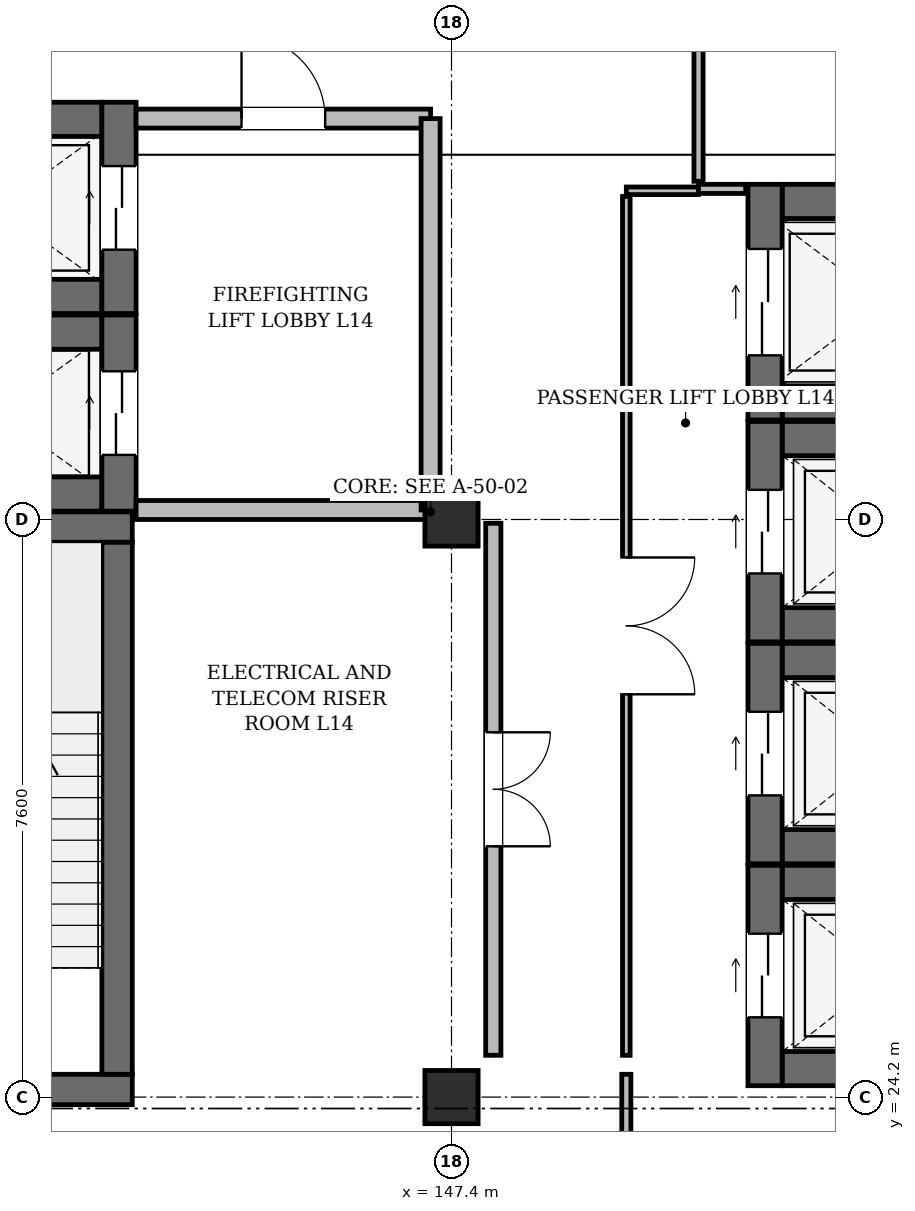
"""IFC4 building model, lengths in metres.
Left out: names, types, materials, properties, quantities, classifications, styles, units other than length and angle.
Written with IfcOpenShell. Run it as: python <this file> out.ifc"""

import sys

from ifc_helpers import new_model, si_unit, direction, frame, frame_2d, origin, origin_2d, place, context, subcontext, project, spatial, rectangle, extrude, element, fill, save


model = new_model("IFC4")
c1 = context("Model", 3, precision=1e-05, world=origin(), true_north=direction((0.0, 1.0)))
c2 = subcontext(c1, "Body", "Model", "MODEL_VIEW")
j1 = project(units=[si_unit("LENGTHUNIT", "METRE"), si_unit("PLANEANGLEUNIT", "RADIAN")], contexts=[c1])
p1 = place(None, origin())
s1 = spatial("IfcSite", under=j1, at=p1, CompositionType="ELEMENT")
p2 = place(p1, origin())
s2 = spatial("IfcBuilding", under=s1, at=p2, CompositionType="ELEMENT")
p3 = place(p2, frame((0.0, 0.0, 61.8)))
s3 = spatial("IfcBuildingStorey", under=s2, at=p3, CompositionType="ELEMENT", Elevation=61.8)
for number, where, z_axis, x_axis in (
    (1, (147.4, 24.2, 0.0), (0.0, 0.0, 1.0), (1.0, 0.0, 0.0)),
    (2, (147.4, 31.8, 0.0), (0.0, 0.0, 1.0), (1.0, 0.0, 0.0)),
):
    element("IfcColumn", number, at=place(p3, frame(where, z_axis=z_axis, x_axis=x_axis)), inside=s3, PredefinedType="COLUMN", context=c2, shape_type="SweptSolid", body=[
        extrude(rectangle(XDim=0.7, YDim=0.7, at=origin_2d()), origin(), (0.0, 0.0, 1.0), 4.11),
    ])
p4 = place(p3, frame((139.4, 24.3, 0.0), z_axis=(0.0, 0.0, 1.0), x_axis=(1.0, 0.0, 0.0)))
e3 = element("IfcWall", 3, at=p4, inside=s3, PredefinedType="SHEAR", context=c2, shape_type="SweptSolid", body=[
    extrude(rectangle(XDim=3.8, YDim=0.4, at=frame_2d((1.9, 0.0))), origin(), (0.0, 0.0, 1.0), 4.11),
])
p5 = place(p4, frame((1.3, 0.0, 0.0)))
e4 = element("IfcOpeningElement", 4, at=p5, cuts=e3, PredefinedType="OPENING", context=c2, shape_type="SweptSolid", body=[
    extrude(rectangle(XDim=1.2, YDim=2.2, at=frame_2d((0.6, 1.1))), frame((0.0, 0.212, 0.0), z_axis=(0.0, -1.0, 0.0), x_axis=(1.0, 0.0, 0.0)), (0.0, 0.0, 1.0), 0.424),
])
p6 = place(p3, frame((139.4, 31.7, 0.0), z_axis=(0.0, 0.0, 1.0), x_axis=(1.0, 0.0, 0.0)))
e5 = element("IfcWall", 5, at=p6, inside=s3, PredefinedType="SHEAR", context=c2, shape_type="SweptSolid", body=[
    extrude(rectangle(XDim=3.8, YDim=0.4, at=frame_2d((1.9, 0.0))), origin(), (0.0, 0.0, 1.0), 4.11),
])
p7 = place(p3, frame((143.0, 24.5, 0.0), z_axis=(0.0, 0.0, 1.0), x_axis=(0.0, 1.0, 0.0)))
e6 = element("IfcWall", 6, at=p7, inside=s3, PredefinedType="SHEAR", context=c2, shape_type="SweptSolid", body=[
    extrude(rectangle(XDim=7.0, YDim=0.4, at=frame_2d((3.5, 0.0))), origin(), (0.0, 0.0, 1.0), 4.11),
])
for number, where, z_axis, x_axis in (
    (7, (140.06, 32.135, 0.0), (0.0, 0.0, 1.0), (1.0, 0.0, 0.0)),
    (8, (140.06, 34.265, 0.0), (0.0, 0.0, 1.0), (1.0, 0.0, 0.0)),
):
    element("IfcWall", number, at=place(p3, frame(where, z_axis=z_axis, x_axis=x_axis)), inside=s3, PredefinedType="SHEAR", context=c2, shape_type="SweptSolid", body=[
        extrude(rectangle(XDim=2.74, YDim=0.45, at=frame_2d((1.37, 0.0))), origin(), (0.0, 0.0, 1.0), 4.11),
    ])
p8 = place(p3, frame((143.025, 31.91, 0.0), z_axis=(0.0, 0.0, 1.0), x_axis=(0.0, 1.0, 0.0)))
e9 = element("IfcWall", 9, at=p8, inside=s3, PredefinedType="SHEAR", context=c2, shape_type="SweptSolid", body=[
    extrude(rectangle(XDim=2.58, YDim=0.45, at=frame_2d((1.29, 0.0))), origin(), (0.0, 0.0, 1.0), 4.11),
])
p9 = place(p8, frame((0.74, 0.0, 0.0)))
e10 = element("IfcOpeningElement", 10, at=p9, cuts=e9, PredefinedType="OPENING", context=c2, shape_type="SweptSolid", body=[
    extrude(rectangle(XDim=1.1, YDim=2.2, at=frame_2d((0.55, 1.1))), frame((0.0, 0.237, 0.0), z_axis=(0.0, -1.0, 0.0), x_axis=(1.0, 0.0, 0.0)), (0.0, 0.0, 1.0), 0.474),
])
for number, where, z_axis, x_axis in (
    (11, (140.06, 34.735, 0.0), (0.0, 0.0, 1.0), (1.0, 0.0, 0.0)),
    (12, (140.06, 37.065, 0.0), (0.0, 0.0, 1.0), (1.0, 0.0, 0.0)),
):
    element("IfcWall", number, at=place(p3, frame(where, z_axis=z_axis, x_axis=x_axis)), inside=s3, PredefinedType="SHEAR", context=c2, shape_type="SweptSolid", body=[
        extrude(rectangle(XDim=2.74, YDim=0.45, at=frame_2d((1.37, 0.0))), origin(), (0.0, 0.0, 1.0), 4.11),
    ])
p10 = place(p3, frame((143.025, 34.51, 0.0), z_axis=(0.0, 0.0, 1.0), x_axis=(0.0, 1.0, 0.0)))
e13 = element("IfcWall", 13, at=p10, inside=s3, PredefinedType="SHEAR", context=c2, shape_type="SweptSolid", body=[
    extrude(rectangle(XDim=2.78, YDim=0.45, at=frame_2d((1.39, 0.0))), origin(), (0.0, 0.0, 1.0), 4.11),
])
p11 = place(p10, frame((0.84, 0.0, 0.0)))
e14 = element("IfcOpeningElement", 14, at=p11, cuts=e13, PredefinedType="OPENING", context=c2, shape_type="SweptSolid", body=[
    extrude(rectangle(XDim=1.1, YDim=2.2, at=frame_2d((0.55, 1.1))), frame((0.0, 0.237, 0.0), z_axis=(0.0, -1.0, 0.0), x_axis=(1.0, 0.0, 0.0)), (0.0, 0.0, 1.0), 0.474),
])
for number, where, z_axis, x_axis in (
    (15, (151.75, 24.575, 0.0), (0.0, 0.0, 1.0), (1.0, 0.0, 0.0)),
    (16, (151.75, 27.025, 0.0), (0.0, 0.0, 1.0), (1.0, 0.0, 0.0)),
):
    element("IfcWall", number, at=place(p3, frame(where, z_axis=z_axis, x_axis=x_axis)), inside=s3, PredefinedType="SHEAR", context=c2, shape_type="SweptSolid", body=[
        extrude(rectangle(XDim=2.7, YDim=0.45, at=frame_2d((1.35, 0.0))), origin(), (0.0, 0.0, 1.0), 4.11),
    ])
p12 = place(p3, frame((151.525, 24.35, 0.0), z_axis=(0.0, 0.0, 1.0), x_axis=(0.0, 1.0, 0.0)))
e17 = element("IfcWall", 17, at=p12, inside=s3, PredefinedType="SHEAR", context=c2, shape_type="SweptSolid", body=[
    extrude(rectangle(XDim=2.9, YDim=0.45, at=frame_2d((1.45, 0.0))), origin(), (0.0, 0.0, 1.0), 4.11),
])
p13 = place(p12, frame((0.9, 0.0, 0.0)))
e18 = element("IfcOpeningElement", 18, at=p13, cuts=e17, PredefinedType="OPENING", context=c2, shape_type="SweptSolid", body=[
    extrude(rectangle(XDim=1.1, YDim=2.2, at=frame_2d((0.55, 1.1))), frame((0.0, 0.237, 0.0), z_axis=(0.0, -1.0, 0.0), x_axis=(1.0, 0.0, 0.0)), (0.0, 0.0, 1.0), 0.474),
])
for number, where, z_axis, x_axis in (
    (19, (151.75, 27.495, 0.0), (0.0, 0.0, 1.0), (1.0, 0.0, 0.0)),
    (20, (151.75, 29.945, 0.0), (0.0, 0.0, 1.0), (1.0, 0.0, 0.0)),
):
    element("IfcWall", number, at=place(p3, frame(where, z_axis=z_axis, x_axis=x_axis)), inside=s3, PredefinedType="SHEAR", context=c2, shape_type="SweptSolid", body=[
        extrude(rectangle(XDim=2.7, YDim=0.45, at=frame_2d((1.35, 0.0))), origin(), (0.0, 0.0, 1.0), 4.11),
    ])
p14 = place(p3, frame((151.525, 27.27, 0.0), z_axis=(0.0, 0.0, 1.0), x_axis=(0.0, 1.0, 0.0)))
e21 = element("IfcWall", 21, at=p14, inside=s3, PredefinedType="SHEAR", context=c2, shape_type="SweptSolid", body=[
    extrude(rectangle(XDim=2.9, YDim=0.45, at=frame_2d((1.45, 0.0))), origin(), (0.0, 0.0, 1.0), 4.11),
])
p15 = place(p14, frame((0.9, 0.0, 0.0)))
e22 = element("IfcOpeningElement", 22, at=p15, cuts=e21, PredefinedType="OPENING", context=c2, shape_type="SweptSolid", body=[
    extrude(rectangle(XDim=1.1, YDim=2.2, at=frame_2d((0.55, 1.1))), frame((0.0, 0.237, 0.0), z_axis=(0.0, -1.0, 0.0), x_axis=(1.0, 0.0, 0.0)), (0.0, 0.0, 1.0), 0.474),
])
for number, where, z_axis, x_axis in (
    (23, (151.75, 30.415, 0.0), (0.0, 0.0, 1.0), (1.0, 0.0, 0.0)),
    (24, (151.75, 32.865, 0.0), (0.0, 0.0, 1.0), (1.0, 0.0, 0.0)),
):
    element("IfcWall", number, at=place(p3, frame(where, z_axis=z_axis, x_axis=x_axis)), inside=s3, PredefinedType="SHEAR", context=c2, shape_type="SweptSolid", body=[
        extrude(rectangle(XDim=2.7, YDim=0.45, at=frame_2d((1.35, 0.0))), origin(), (0.0, 0.0, 1.0), 4.11),
    ])
p16 = place(p3, frame((151.525, 30.19, 0.0), z_axis=(0.0, 0.0, 1.0), x_axis=(0.0, 1.0, 0.0)))
e25 = element("IfcWall", 25, at=p16, inside=s3, PredefinedType="SHEAR", context=c2, shape_type="SweptSolid", body=[
    extrude(rectangle(XDim=2.9, YDim=0.45, at=frame_2d((1.45, 0.0))), origin(), (0.0, 0.0, 1.0), 4.11),
])
p17 = place(p16, frame((0.9, 0.0, 0.0)))
e26 = element("IfcOpeningElement", 26, at=p17, cuts=e25, PredefinedType="OPENING", context=c2, shape_type="SweptSolid", body=[
    extrude(rectangle(XDim=1.1, YDim=2.2, at=frame_2d((0.55, 1.1))), frame((0.0, 0.237, 0.0), z_axis=(0.0, -1.0, 0.0), x_axis=(1.0, 0.0, 0.0)), (0.0, 0.0, 1.0), 0.474),
])
for number, where, z_axis, x_axis in (
    (27, (151.75, 33.335, 0.0), (0.0, 0.0, 1.0), (1.0, 0.0, 0.0)),
    (28, (151.75, 35.985, 0.0), (0.0, 0.0, 1.0), (1.0, 0.0, 0.0)),
):
    element("IfcWall", number, at=place(p3, frame(where, z_axis=z_axis, x_axis=x_axis)), inside=s3, PredefinedType="SHEAR", context=c2, shape_type="SweptSolid", body=[
        extrude(rectangle(XDim=2.7, YDim=0.45, at=frame_2d((1.35, 0.0))), origin(), (0.0, 0.0, 1.0), 4.11),
    ])
p18 = place(p3, frame((151.525, 33.11, 0.0), z_axis=(0.0, 0.0, 1.0), x_axis=(0.0, 1.0, 0.0)))
e29 = element("IfcWall", 29, at=p18, inside=s3, PredefinedType="SHEAR", context=c2, shape_type="SweptSolid", body=[
    extrude(rectangle(XDim=3.1, YDim=0.45, at=frame_2d((1.55, 0.0))), origin(), (0.0, 0.0, 1.0), 4.11),
])
p19 = place(p18, frame((0.85, 0.0, 0.0)))
e30 = element("IfcOpeningElement", 30, at=p19, cuts=e29, PredefinedType="OPENING", context=c2, shape_type="SweptSolid", body=[
    extrude(rectangle(XDim=1.4, YDim=2.3, at=frame_2d((0.7, 1.15))), frame((0.0, 0.237, 0.0), z_axis=(0.0, -1.0, 0.0), x_axis=(1.0, 0.0, 0.0)), (0.0, 0.0, 1.0), 0.474),
])
p20 = place(p3, frame((143.25, 37.075, 0.0), z_axis=(0.0, 0.0, 1.0), x_axis=(1.0, 0.0, 0.0)))
e31 = element("IfcWall", 31, at=p20, inside=s3, PredefinedType="SOLIDWALL", context=c2, shape_type="SweptSolid", body=[
    extrude(rectangle(XDim=3.875, YDim=0.25, at=frame_2d((1.938, 0.0))), origin(), (0.0, 0.0, 1.0), 4.005),
])
p21 = place(p20, frame((1.387, 0.0, 0.0)))
e32 = element("IfcOpeningElement", 32, at=p21, cuts=e31, PredefinedType="OPENING", context=c2, shape_type="SweptSolid", body=[
    extrude(rectangle(XDim=1.1, YDim=2.2, at=frame_2d((0.55, 1.1))), frame((0.0, 0.137, 0.0), z_axis=(0.0, -1.0, 0.0), x_axis=(1.0, 0.0, 0.0)), (0.0, 0.0, 1.0), 0.274),
])
p22 = place(p3, frame((143.25, 31.925, 0.0), z_axis=(0.0, 0.0, 1.0), x_axis=(1.0, 0.0, 0.0)))
e33 = element("IfcWall", 33, at=p22, inside=s3, PredefinedType="SOLIDWALL", context=c2, shape_type="SweptSolid", body=[
    extrude(rectangle(XDim=3.875, YDim=0.25, at=frame_2d((1.938, 0.0))), origin(), (0.0, 0.0, 1.0), 3.445),
])
p23 = place(p3, frame((147.125, 31.925, 0.0), z_axis=(0.0, 0.0, 1.0), x_axis=(0.0, 1.0, 0.0)))
e34 = element("IfcWall", 34, at=p23, inside=s3, PredefinedType="SOLIDWALL", context=c2, shape_type="SweptSolid", body=[
    extrude(rectangle(XDim=5.15, YDim=0.25, at=frame_2d((2.575, 0.0))), origin(), (0.0, 0.0, 1.0), 3.445),
])
p24 = place(p3, frame((147.95, 31.75, 0.0), z_axis=(0.0, 0.0, 1.0), x_axis=(0.0, -1.0, 0.0)))
e35 = element("IfcWall", 35, at=p24, inside=s3, PredefinedType="PARTITIONING", context=c2, shape_type="SweptSolid", body=[
    extrude(rectangle(XDim=7.0, YDim=0.2, at=frame_2d((3.5, 0.0))), origin(), (0.0, 0.0, 1.0), 4.005),
])
p25 = place(p24, frame((2.75, 0.0, 0.0)))
e36 = element("IfcOpeningElement", 36, at=p25, cuts=e35, PredefinedType="OPENING", context=c2, shape_type="SweptSolid", body=[
    extrude(rectangle(XDim=1.5, YDim=2.2, at=frame_2d((0.75, 1.1))), frame((0.0, 0.112, 0.0), z_axis=(0.0, -1.0, 0.0), x_axis=(1.0, 0.0, 0.0)), (0.0, 0.0, 1.0), 0.224),
])
p26 = place(p3, frame((149.7, 24.75, 0.0), z_axis=(0.0, 0.0, 1.0), x_axis=(0.0, 1.0, 0.0)))
e37 = element("IfcWall", 37, at=p26, inside=s3, PredefinedType="PARTITIONING", context=c2, shape_type="SweptSolid", body=[
    extrude(rectangle(XDim=11.3, YDim=0.1, at=frame_2d((5.65, 0.0))), origin(), (0.0, 0.0, 1.0), 4.005),
])
p27 = place(p26, frame((4.75, 0.0, 0.0)))
e38 = element("IfcOpeningElement", 38, at=p27, cuts=e37, PredefinedType="OPENING", context=c2, shape_type="SweptSolid", body=[
    extrude(rectangle(XDim=1.8, YDim=2.4, at=frame_2d((0.9, 1.2))), frame((0.0, 0.062, 0.0), z_axis=(0.0, -1.0, 0.0), x_axis=(1.0, 0.0, 0.0)), (0.0, 0.0, 1.0), 0.124),
])
p28 = place(p3, frame((149.7, 36.125, 0.0), z_axis=(0.0, 0.0, 1.0), x_axis=(1.0, 0.0, 0.0)))
e39 = element("IfcWall", 39, at=p28, inside=s3, PredefinedType="PARTITIONING", context=c2, shape_type="SweptSolid", body=[
    extrude(rectangle(XDim=0.95, YDim=0.1, at=frame_2d((0.475, 0.0))), origin(), (0.0, 0.0, 1.0), 4.005),
])
p29 = place(p3, frame((150.65, 36.15, 0.0), z_axis=(0.0, 0.0, 1.0), x_axis=(1.0, 0.0, 0.0)))
e40 = element("IfcWall", 40, at=p29, inside=s3, PredefinedType="PARTITIONING", context=c2, shape_type="SweptSolid", body=[
    extrude(rectangle(XDim=0.62, YDim=0.12, at=frame_2d((0.31, 0.0))), origin(), (0.0, 0.0, 1.0), 4.005),
])
p30 = place(p3, frame((149.7, 24.5, 0.0), z_axis=(0.0, 0.0, 1.0), x_axis=(0.0, -1.0, 0.0)))
e41 = element("IfcWall", 41, at=p30, inside=s3, PredefinedType="PARTITIONING", context=c2, shape_type="SweptSolid", body=[
    extrude(rectangle(XDim=0.8, YDim=0.12, at=frame_2d((0.4, 0.0))), origin(), (0.0, 0.0, 1.0), 4.005),
])
p31 = place(p3, frame((150.65, 54.6, 0.0), z_axis=(0.0, 0.0, 1.0), x_axis=(0.0, -1.0, 0.0)))
e42 = element("IfcWall", 42, at=p31, inside=s3, PredefinedType="PARTITIONING", context=c2, shape_type="SweptSolid", body=[
    extrude(rectangle(XDim=18.35, YDim=0.12, at=frame_2d((9.175, 0.0))), origin(), (0.0, 0.0, 1.0), 4.005),
])
p32 = place(p31, frame((8.7, 0.0, 0.0)))
e43 = element("IfcOpeningElement", 43, at=p32, cuts=e42, PredefinedType="OPENING", context=c2, shape_type="SweptSolid", body=[
    extrude(rectangle(XDim=0.95, YDim=2.2, at=frame_2d((0.475, 1.1))), frame((0.0, 0.072, 0.0), z_axis=(0.0, -1.0, 0.0), x_axis=(1.0, 0.0, 0.0)), (0.0, 0.0, 1.0), 0.144),
])
p33 = place(p9, origin())
e44 = element("IfcDoor", 44, at=p33, inside=s3, OperationType="DOUBLE_DOOR_SLIDING", PredefinedType="DOOR", context=c2, shape_type="SweptSolid", body=[
    extrude(rectangle(XDim=1.1, YDim=2.2, at=frame_2d((0.55, 1.1))), frame((0.0, 0.025, 0.0), z_axis=(0.0, -1.0, 0.0), x_axis=(1.0, 0.0, 0.0)), (0.0, 0.0, 1.0), 0.05),
])
fill(e10, e44)
p34 = place(p11, origin())
e45 = element("IfcDoor", 45, at=p34, inside=s3, OperationType="DOUBLE_DOOR_SLIDING", PredefinedType="DOOR", context=c2, shape_type="SweptSolid", body=[
    extrude(rectangle(XDim=1.1, YDim=2.2, at=frame_2d((0.55, 1.1))), frame((0.0, 0.025, 0.0), z_axis=(0.0, -1.0, 0.0), x_axis=(1.0, 0.0, 0.0)), (0.0, 0.0, 1.0), 0.05),
])
fill(e14, e45)
p35 = place(p13, origin())
e46 = element("IfcDoor", 46, at=p35, inside=s3, OperationType="DOUBLE_DOOR_SLIDING", PredefinedType="DOOR", context=c2, shape_type="SweptSolid", body=[
    extrude(rectangle(XDim=1.1, YDim=2.2, at=frame_2d((0.55, 1.1))), frame((0.0, 0.025, 0.0), z_axis=(0.0, -1.0, 0.0), x_axis=(1.0, 0.0, 0.0)), (0.0, 0.0, 1.0), 0.05),
])
fill(e18, e46)
p36 = place(p15, origin())
e47 = element("IfcDoor", 47, at=p36, inside=s3, OperationType="DOUBLE_DOOR_SLIDING", PredefinedType="DOOR", context=c2, shape_type="SweptSolid", body=[
    extrude(rectangle(XDim=1.1, YDim=2.2, at=frame_2d((0.55, 1.1))), frame((0.0, 0.025, 0.0), z_axis=(0.0, -1.0, 0.0), x_axis=(1.0, 0.0, 0.0)), (0.0, 0.0, 1.0), 0.05),
])
fill(e22, e47)
p37 = place(p17, origin())
e48 = element("IfcDoor", 48, at=p37, inside=s3, OperationType="DOUBLE_DOOR_SLIDING", PredefinedType="DOOR", context=c2, shape_type="SweptSolid", body=[
    extrude(rectangle(XDim=1.1, YDim=2.2, at=frame_2d((0.55, 1.1))), frame((0.0, 0.025, 0.0), z_axis=(0.0, -1.0, 0.0), x_axis=(1.0, 0.0, 0.0)), (0.0, 0.0, 1.0), 0.05),
])
fill(e26, e48)
p38 = place(p19, origin())
e49 = element("IfcDoor", 49, at=p38, inside=s3, OperationType="DOUBLE_DOOR_SLIDING", PredefinedType="DOOR", context=c2, shape_type="SweptSolid", body=[
    extrude(rectangle(XDim=1.4, YDim=2.3, at=frame_2d((0.7, 1.15))), frame((0.0, 0.025, 0.0), z_axis=(0.0, -1.0, 0.0), x_axis=(1.0, 0.0, 0.0)), (0.0, 0.0, 1.0), 0.05),
])
fill(e30, e49)
p39 = place(p21, origin())
e50 = element("IfcDoor", 50, at=p39, inside=s3, OperationType="SINGLE_SWING_LEFT", PredefinedType="DOOR", context=c2, shape_type="SweptSolid", body=[
    extrude(rectangle(XDim=1.1, YDim=2.2, at=frame_2d((0.55, 1.1))), frame((0.0, 0.025, 0.0), z_axis=(0.0, -1.0, 0.0), x_axis=(1.0, 0.0, 0.0)), (0.0, 0.0, 1.0), 0.05),
])
fill(e32, e50)
p40 = place(p25, origin())
e51 = element("IfcDoor", 51, at=p40, inside=s3, OperationType="DOUBLE_DOOR_SINGLE_SWING", PredefinedType="DOOR", context=c2, shape_type="SweptSolid", body=[
    extrude(rectangle(XDim=1.5, YDim=2.2, at=frame_2d((0.75, 1.1))), frame((0.0, 0.025, 0.0), z_axis=(0.0, -1.0, 0.0), x_axis=(1.0, 0.0, 0.0)), (0.0, 0.0, 1.0), 0.05),
])
fill(e36, e51)
p41 = place(p27, frame((1.8, 0.0, 0.0), z_axis=(0.0, 0.0, 1.0), x_axis=(-1.0, 0.0, 0.0)))
e52 = element("IfcDoor", 52, at=p41, inside=s3, OperationType="DOUBLE_DOOR_SINGLE_SWING", PredefinedType="DOOR", context=c2, shape_type="SweptSolid", body=[
    extrude(rectangle(XDim=1.8, YDim=2.4, at=frame_2d((0.9, 1.2))), frame((0.0, 0.025, 0.0), z_axis=(0.0, -1.0, 0.0), x_axis=(1.0, 0.0, 0.0)), (0.0, 0.0, 1.0), 0.05),
])
fill(e38, e52)
save(model, sys.argv[1])
